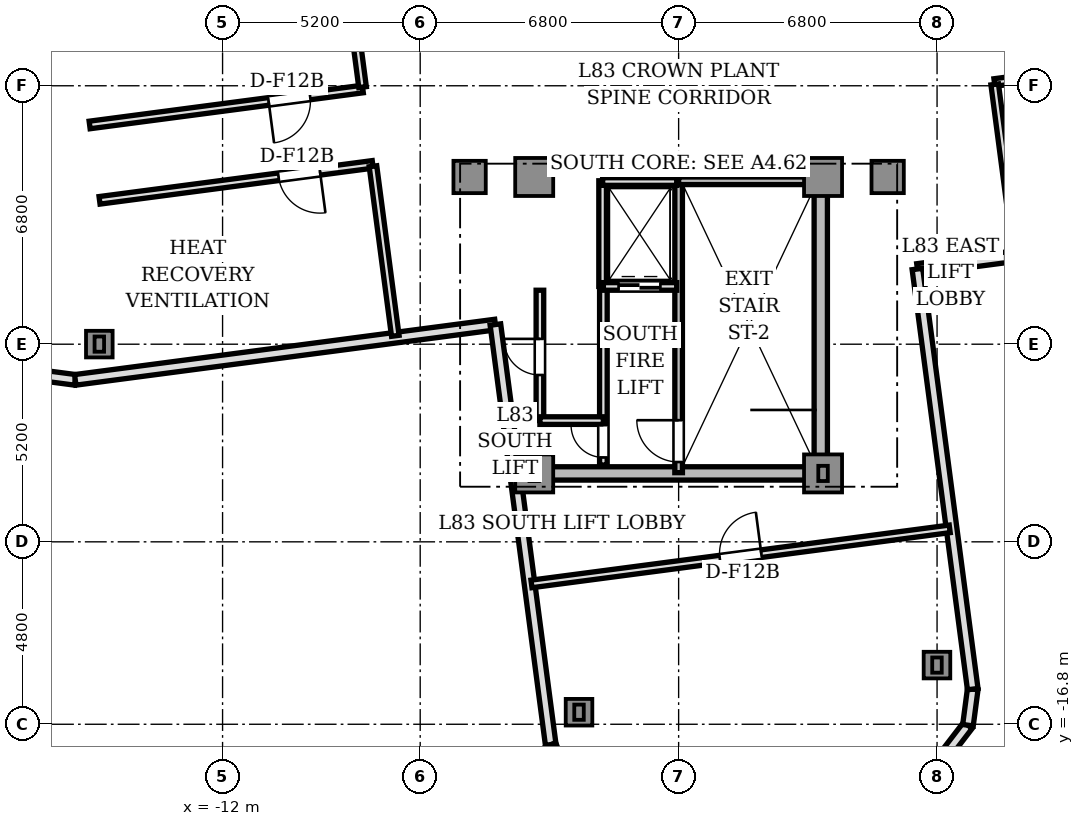
"""IFC4 building model, lengths in metres.
Left out: names, types, materials, properties, quantities, classifications, styles, units other than length and angle.
Written with IfcOpenShell. Run it as: python <this file> out.ifc"""

import sys

from ifc_helpers import new_model, si_unit, direction, frame, frame_2d, origin, origin_2d, place, context, subcontext, project, spatial, polyline, rectangle, i_section, outline, extrude, source, transform, mapped, element, fill, save


model = new_model("IFC4")
c1 = context("Model", 3, precision=1e-05, world=origin(), true_north=direction((0.0, 1.0)))
c2 = subcontext(c1, "Body", "Model", "MODEL_VIEW")
j1 = project(units=[si_unit("LENGTHUNIT", "METRE"), si_unit("PLANEANGLEUNIT", "RADIAN")], contexts=[c1])
p1 = place(None, origin())
s1 = spatial("IfcSite", under=j1, at=p1, CompositionType="ELEMENT")
p2 = place(p1, origin())
s2 = spatial("IfcBuilding", under=s1, at=p2, CompositionType="ELEMENT")
p3 = place(p2, frame((0.0, 0.0, 300.3)))
s3 = spatial("IfcBuildingStorey", under=s2, at=p3, CompositionType="ELEMENT", Elevation=300.3)
p4 = place(p3, frame((-3.55, -10.2, 0.0), z_axis=(0.0, 0.0, 1.0), x_axis=(1.0, 0.0, 0.0)))
e1 = element("IfcWall", 1, at=p4, inside=s3, PredefinedType="SHEAR", context=c2, shape_type="SweptSolid", body=[
    extrude(rectangle(XDim=7.1, YDim=0.35, at=frame_2d((3.55, 0.0))), origin(), (0.0, 0.0, 1.0), 4.25),
])
p5 = place(p3, frame((3.74, -9.75, 0.0), z_axis=(0.0, 0.0, 1.0), x_axis=(0.0, 1.0, 0.0)))
e2 = element("IfcWall", 2, at=p5, inside=s3, PredefinedType="SHEAR", context=c2, shape_type="SweptSolid", body=[
    extrude(rectangle(XDim=6.9, YDim=0.35, at=frame_2d((3.45, 0.0))), origin(), (0.0, 0.0, 1.0), 4.25),
])
m1 = source(origin(), c2, "Body", "SweptSolid", [
    extrude(rectangle(XDim=1.0, YDim=1.0, at=origin_2d()), origin(), (0.0, 0.0, 1.0), 4.25),
])
for number, where, z_axis, x_axis in (
    (3, (-3.8, -2.4, 0.0), (0.0, 0.0, 1.0), (1.0, 0.0, 0.0)),
    (4, (3.8, -2.4, 0.0), (0.0, 0.0, 1.0), (1.0, 0.0, 0.0)),
    (5, (-3.8, -10.2, 0.0), (0.0, 0.0, 1.0), (1.0, 0.0, 0.0)),
    (6, (3.8, -10.2, 0.0), (0.0, 0.0, 1.0), (1.0, 0.0, 0.0)),
):
    element("IfcColumn", number, at=place(p3, frame(where, z_axis=z_axis, x_axis=x_axis)), inside=s3, PredefinedType="COLUMN", context=c2, shape_type="MappedRepresentation", body=[
        mapped(m1, transform((0.0, 0.0, 0.0), scale=1.0)),
    ])
m2 = source(origin(), c2, "Body", "SweptSolid", [
    extrude(rectangle(XDim=0.85, YDim=0.85, at=origin_2d()), origin(), (0.0, 0.0, 1.0), 4.25),
])
for number, where, z_axis, x_axis in (
    (7, (5.5, -2.4, 0.0), (0.0, 0.0, 1.0), (1.0, 0.0, 0.0)),
    (8, (-5.5, -2.4, 0.0), (0.0, 0.0, 1.0), (1.0, 0.0, 0.0)),
):
    element("IfcColumn", number, at=place(p3, frame(where, z_axis=z_axis, x_axis=x_axis)), inside=s3, PredefinedType="COLUMN", context=c2, shape_type="MappedRepresentation", body=[
        mapped(m2, transform((0.0, 0.0, 0.0), scale=1.0)),
    ])
m3 = source(origin(), c2, "Body", "SweptSolid", [
    extrude(rectangle(XDim=0.7, YDim=0.7, at=origin_2d()), origin(), (0.0, 0.0, 1.0), 4.25),
])
for number, where, z_axis, x_axis in (
    (9, (-15.243, -6.798, 0.0), (0.0, 0.0, 1.0), (1.0, 0.0, 0.0)),
    (10, (-2.621, -16.483, 0.0), (0.0, 0.0, 1.0), (1.0, 0.0, 0.0)),
    (11, (6.798, -15.243, 0.0), (0.0, 0.0, 1.0), (1.0, 0.0, 0.0)),
):
    element("IfcColumn", number, at=place(p3, frame(where, z_axis=z_axis, x_axis=x_axis)), inside=s3, PredefinedType="COLUMN", context=c2, shape_type="MappedRepresentation", body=[
        mapped(m3, transform((0.0, 0.0, 0.0), scale=1.0)),
    ])
m4 = source(origin(), c2, "Body", "SweptSolid", [
    extrude(i_section(OverallWidth=0.25, OverallDepth=0.4, WebThickness=0.013, FlangeThickness=0.013, FilletRadius=0.014, at=origin_2d()), origin(), (0.0, 0.0, 1.0), 5.959),
])
p6 = place(p3, frame((-3.8, -10.2, 4.25), z_axis=(0.0, 0.0, 1.0), x_axis=(1.0, 0.0, 0.0)))
e12 = element("IfcColumn", 12, at=p6, inside=s3, PredefinedType="COLUMN", context=c2, shape_type="MappedRepresentation", body=[
    mapped(m4, transform((0.0, 0.0, 0.0), scale=1.0)),
])
m5 = source(origin(), c2, "Body", "SweptSolid", [
    extrude(i_section(OverallWidth=0.25, OverallDepth=0.4, WebThickness=0.013, FlangeThickness=0.013, FilletRadius=0.014, at=origin_2d()), origin(), (0.0, 0.0, 1.0), 8.953),
])
p7 = place(p3, frame((3.8, -10.2, 4.25), z_axis=(0.0, 0.0, 1.0), x_axis=(1.0, 0.0, 0.0)))
e13 = element("IfcColumn", 13, at=p7, inside=s3, PredefinedType="COLUMN", context=c2, shape_type="MappedRepresentation", body=[
    mapped(m5, transform((0.0, 0.0, 0.0), scale=1.0)),
])
m6 = source(origin(), c2, "Body", "SweptSolid", [
    extrude(i_section(OverallWidth=0.25, OverallDepth=0.4, WebThickness=0.013, FlangeThickness=0.013, FilletRadius=0.014, at=origin_2d()), origin(), (0.0, 0.0, 1.0), 1.452),
])
p8 = place(p3, frame((-15.243, -6.798, 4.25), z_axis=(0.0, 0.0, 1.0), x_axis=(1.0, 0.0, 0.0)))
e14 = element("IfcColumn", 14, at=p8, inside=s3, PredefinedType="COLUMN", context=c2, shape_type="MappedRepresentation", body=[
    mapped(m6, transform((0.0, 0.0, 0.0), scale=1.0)),
])
m7 = source(origin(), c2, "Body", "SweptSolid", [
    extrude(i_section(OverallWidth=0.25, OverallDepth=0.4, WebThickness=0.013, FlangeThickness=0.013, FilletRadius=0.014, at=origin_2d()), origin(), (0.0, 0.0, 1.0), 6.424),
])
p9 = place(p3, frame((-2.621, -16.483, 4.25), z_axis=(0.0, 0.0, 1.0), x_axis=(1.0, 0.0, 0.0)))
e15 = element("IfcColumn", 15, at=p9, inside=s3, PredefinedType="COLUMN", context=c2, shape_type="MappedRepresentation", body=[
    mapped(m7, transform((0.0, 0.0, 0.0), scale=1.0)),
])
m8 = source(origin(), c2, "Body", "SweptSolid", [
    extrude(i_section(OverallWidth=0.25, OverallDepth=0.4, WebThickness=0.013, FlangeThickness=0.013, FilletRadius=0.014, at=origin_2d()), origin(), (0.0, 0.0, 1.0), 10.134),
])
p10 = place(p3, frame((6.798, -15.243, 4.25), z_axis=(0.0, 0.0, 1.0), x_axis=(1.0, 0.0, 0.0)))
e16 = element("IfcColumn", 16, at=p10, inside=s3, PredefinedType="COLUMN", context=c2, shape_type="MappedRepresentation", body=[
    mapped(m8, transform((0.0, 0.0, 0.0), scale=1.0)),
])
p11 = place(p3, frame((6.283, -4.821, 0.0), z_axis=(0.0, 0.0, 1.0), x_axis=(0.991445499165, 0.130521347626, 0.0)))
e17 = element("IfcWall", 17, at=p11, inside=s3, PredefinedType="SOLIDWALL", context=c2, shape_type="SweptSolid", body=[
    extrude(outline(polyline([(0.0, 0.0), (11.15, 0.0), (11.15, 18.529), (0.0, 14.175), (0.0, 0.0)])), frame((0.0, 0.14, 0.0), z_axis=(0.0, -1.0, 0.0), x_axis=(1.0, 0.0, 0.0)), (0.0, 0.0, 1.0), 0.28),
])
p12 = place(p3, frame((-16.825, -7.613, 0.0), z_axis=(0.0, 0.0, 1.0), x_axis=(0.991444747987, -0.130527053476, 0.0)))
e18 = element("IfcWall", 18, at=p12, inside=s3, PredefinedType="SOLIDWALL", context=c2, shape_type="SweptSolid", body=[
    extrude(outline(polyline([(0.0, 0.0), (0.958, 0.0), (0.958, 5.446), (0.0, 5.072), (0.0, 0.0)])), frame((0.0, 0.14, 0.0), z_axis=(0.0, -1.0, 0.0), x_axis=(1.0, 0.0, 0.0)), (0.0, 0.0, 1.0), 0.28),
])
p13 = place(p3, frame((-15.876, -7.738, 0.0), z_axis=(0.0, 0.0, 1.0), x_axis=(0.991445499165, 0.130521347626, 0.0)))
e19 = element("IfcWall", 19, at=p13, inside=s3, PredefinedType="SOLIDWALL", context=c2, shape_type="SweptSolid", body=[
    extrude(outline(polyline([(0.0, 0.0), (11.15, 0.0), (11.15, 9.801), (0.0, 5.446), (0.0, 0.0)])), frame((0.0, 0.14, 0.0), z_axis=(0.0, -1.0, 0.0), x_axis=(1.0, 0.0, 0.0)), (0.0, 0.0, 1.0), 0.28),
])
p14 = place(p3, frame((-4.821, -6.283, 0.0), z_axis=(0.0, 0.0, 1.0), x_axis=(0.130521347626, -0.991445499165, 0.0)))
e20 = element("IfcWall", 20, at=p14, inside=s3, PredefinedType="SOLIDWALL", context=c2, shape_type="SweptSolid", body=[
    extrude(outline(polyline([(0.0, 0.0), (11.15, 0.0), (11.15, 10.374), (0.0, 9.801), (0.0, 0.0)])), frame((0.0, 0.14, 0.0), z_axis=(0.0, -1.0, 0.0), x_axis=(1.0, 0.0, 0.0)), (0.0, 0.0, 1.0), 0.28),
])
p15 = place(p3, frame((-3.366, -17.338, 0.0), z_axis=(0.0, 0.0, 1.0), x_axis=(0.382659506909, -0.923889442397, 0.0)))
e21 = element("IfcWall", 21, at=p15, inside=s3, PredefinedType="SOLIDWALL", context=c2, shape_type="SweptSolid", body=[
    extrude(outline(polyline([(0.0, 0.0), (0.958, 0.0), (0.958, 10.519), (0.0, 10.374), (0.0, 0.0)])), frame((0.0, 0.14, 0.0), z_axis=(0.0, -1.0, 0.0), x_axis=(1.0, 0.0, 0.0)), (0.0, 0.0, 1.0), 0.28),
])
p16 = place(p3, frame((7.031, -17.585, 0.0), z_axis=(0.0, 0.0, 1.0), x_axis=(0.60861352168, 0.793466811674, 0.0)))
e22 = element("IfcWall", 22, at=p16, inside=s3, PredefinedType="SOLIDWALL", context=c2, shape_type="SweptSolid", body=[
    extrude(outline(polyline([(0.0, 0.0), (0.958, 0.0), (0.958, 14.699), (0.0, 14.469), (0.0, 0.0)])), frame((0.0, 0.14, 0.0), z_axis=(0.0, -1.0, 0.0), x_axis=(1.0, 0.0, 0.0)), (0.0, 0.0, 1.0), 0.28),
])
p17 = place(p3, frame((7.613, -16.825, 0.0), z_axis=(0.0, 0.0, 1.0), x_axis=(0.130527053476, 0.991444747987, 0.0)))
e23 = element("IfcWall", 23, at=p17, inside=s3, PredefinedType="SOLIDWALL", context=c2, shape_type="SweptSolid", body=[
    extrude(outline(polyline([(0.0, 0.0), (0.958, 0.0), (0.958, 14.748), (0.0, 14.699), (0.0, 0.0)])), frame((0.0, 0.14, 0.0), z_axis=(0.0, -1.0, 0.0), x_axis=(1.0, 0.0, 0.0)), (0.0, 0.0, 1.0), 0.28),
])
p18 = place(p3, frame((7.738, -15.876, 0.0), z_axis=(0.0, 0.0, 1.0), x_axis=(-0.130521347626, 0.991445499165, 0.0)))
e24 = element("IfcWall", 24, at=p18, inside=s3, PredefinedType="SOLIDWALL", context=c2, shape_type="SweptSolid", body=[
    extrude(outline(polyline([(0.0, 0.0), (11.15, 0.0), (11.15, 14.175), (0.0, 14.748), (0.0, 0.0)])), frame((0.0, 0.14, 0.0), z_axis=(0.0, -1.0, 0.0), x_axis=(1.0, 0.0, 0.0)), (0.0, 0.0, 1.0), 0.28),
])
p19 = place(p3, frame((0.0, -10.18, 0.0), z_axis=(0.0, 0.0, 1.0), x_axis=(0.0, 1.0, 0.0)))
e25 = element("IfcWall", 25, at=p19, inside=s3, PredefinedType="SOLIDWALL", context=c2, shape_type="SweptSolid", body=[
    extrude(rectangle(XDim=7.68, YDim=0.2, at=frame_2d((3.84, 0.0))), origin(), (0.0, 0.0, 1.0), 4.15),
])
p20 = place(p19, frame((0.28, 0.0, 0.0)))
e26 = element("IfcOpeningElement", 26, at=p20, cuts=e25, PredefinedType="OPENING", context=c2, shape_type="SweptSolid", body=[
    extrude(rectangle(XDim=1.1, YDim=2.15, at=frame_2d((0.55, 1.075))), frame((0.0, 0.11, 0.0), z_axis=(0.0, -1.0, 0.0), x_axis=(1.0, 0.0, 0.0)), (0.0, 0.0, 1.0), 0.22),
])
p21 = place(p3, frame((0.0, -2.5, 0.0), z_axis=(0.0, 0.0, 1.0), x_axis=(1.0, 0.0, 0.0)))
e27 = element("IfcWall", 27, at=p21, inside=s3, PredefinedType="SOLIDWALL", context=c2, shape_type="SweptSolid", body=[
    extrude(rectangle(XDim=3.72, YDim=0.2, at=frame_2d((1.86, 0.0))), origin(), (0.0, 0.0, 1.0), 4.15),
])
p22 = place(p3, frame((-1.98, -9.98, 0.0), z_axis=(0.0, 0.0, 1.0), x_axis=(0.0, 1.0, 0.0)))
e28 = element("IfcWall", 28, at=p22, inside=s3, PredefinedType="SOLIDWALL", context=c2, shape_type="SweptSolid", body=[
    extrude(rectangle(XDim=4.66, YDim=0.2, at=frame_2d((2.33, 0.0))), origin(), (0.0, 0.0, 1.0), 3.7),
])
p23 = place(p22, frame((0.2, 0.0, 0.0)))
e29 = element("IfcOpeningElement", 29, at=p23, cuts=e28, PredefinedType="OPENING", context=c2, shape_type="SweptSolid", body=[
    extrude(rectangle(XDim=0.85, YDim=2.1, at=frame_2d((0.425, 1.05))), frame((0.0, 0.11, 0.0), z_axis=(0.0, -1.0, 0.0), x_axis=(1.0, 0.0, 0.0)), (0.0, 0.0, 1.0), 0.22),
])
p24 = place(p3, frame((-2.0, -5.28, 0.0), z_axis=(0.0, 0.0, 1.0), x_axis=(0.0, 1.0, 0.0)))
e30 = element("IfcWall", 30, at=p24, inside=s3, PredefinedType="SOLIDWALL", context=c2, shape_type="SweptSolid", body=[
    extrude(rectangle(XDim=2.78, YDim=0.2, at=frame_2d((1.39, 0.0))), origin(), (0.0, 0.0, 1.0), 3.7),
])
p25 = place(p3, frame((-2.0, -2.52, 0.0), z_axis=(0.0, 0.0, 1.0), x_axis=(1.0, 0.0, 0.0)))
e31 = element("IfcWall", 31, at=p25, inside=s3, PredefinedType="SOLIDWALL", context=c2, shape_type="SweptSolid", body=[
    extrude(rectangle(XDim=1.95, YDim=0.2, at=frame_2d((0.975, 0.0))), origin(), (0.0, 0.0, 1.0), 3.7),
])
p26 = place(p3, frame((-1.98, -5.28, 0.0), z_axis=(0.0, 0.0, 1.0), x_axis=(1.0, 0.0, 0.0)))
e32 = element("IfcWall", 32, at=p26, inside=s3, PredefinedType="SOLIDWALL", context=c2, shape_type="SweptSolid", body=[
    extrude(rectangle(XDim=1.93, YDim=0.2, at=frame_2d((0.965, 0.0))), origin(), (0.0, 0.0, 1.0), 3.7),
])
p27 = place(p26, frame((0.4, 0.0, 0.0)))
e33 = element("IfcOpeningElement", 33, at=p27, cuts=e32, PredefinedType="OPENING", context=c2, shape_type="SweptSolid", body=[
    extrude(rectangle(XDim=1.1, YDim=2.2, at=frame_2d((0.55, 1.1))), frame((0.0, 0.11, 0.0), z_axis=(0.0, -1.0, 0.0), x_axis=(1.0, 0.0, 0.0)), (0.0, 0.0, 1.0), 0.22),
])
p28 = place(p3, frame((-3.65, -8.81, 0.0), z_axis=(0.0, 0.0, 1.0), x_axis=(0.0, 1.0, 0.0)))
e34 = element("IfcWall", 34, at=p28, inside=s3, PredefinedType="SOLIDWALL", context=c2, shape_type="SweptSolid", body=[
    extrude(rectangle(XDim=3.43, YDim=0.2, at=frame_2d((1.715, 0.0))), origin(), (0.0, 0.0, 1.0), 3.7),
])
p29 = place(p28, frame((1.2, 0.0, 0.0)))
e35 = element("IfcOpeningElement", 35, at=p29, cuts=e34, PredefinedType="OPENING", context=c2, shape_type="SweptSolid", body=[
    extrude(rectangle(XDim=0.95, YDim=2.15, at=frame_2d((0.475, 1.075))), frame((0.0, 0.11, 0.0), z_axis=(0.0, -1.0, 0.0), x_axis=(1.0, 0.0, 0.0)), (0.0, 0.0, 1.0), 0.22),
])
p30 = place(p3, frame((-3.65, -8.81, 0.0), z_axis=(0.0, 0.0, 1.0), x_axis=(1.0, 0.0, 0.0)))
e36 = element("IfcWall", 36, at=p30, inside=s3, PredefinedType="SOLIDWALL", context=c2, shape_type="SweptSolid", body=[
    extrude(rectangle(XDim=1.67, YDim=0.2, at=frame_2d((0.835, 0.0))), origin(), (0.0, 0.0, 1.0), 3.7),
])
p31 = place(p3, frame((8.31, 0.085, 0.0), z_axis=(0.0, 0.0, 1.0), x_axis=(0.991445353075, 0.130522457324, 0.0)))
e37 = element("IfcWall", 37, at=p31, inside=s3, PredefinedType="SOLIDWALL", context=c2, shape_type="SweptSolid", body=[
    extrude(rectangle(XDim=7.25, YDim=0.2, at=frame_2d((3.625, 0.0))), origin(), (0.0, 0.0, 1.0), 3.7),
])
p32 = place(p31, frame((1.4, 0.0, 0.0)))
e38 = element("IfcOpeningElement", 38, at=p32, cuts=e37, PredefinedType="OPENING", context=c2, shape_type="SweptSolid", body=[
    extrude(rectangle(XDim=1.1, YDim=2.15, at=frame_2d((0.55, 1.075))), frame((0.0, 0.11, 0.0), z_axis=(0.0, -1.0, 0.0), x_axis=(1.0, 0.0, 0.0)), (0.0, 0.0, 1.0), 0.22),
])
p33 = place(p3, frame((8.904, -4.426, 0.0), z_axis=(0.0, 0.0, 1.0), x_axis=(-0.130528890923, 0.991444506079, 0.0)))
e39 = element("IfcWall", 39, at=p33, inside=s3, PredefinedType="SOLIDWALL", context=c2, shape_type="SweptSolid", body=[
    extrude(rectangle(XDim=4.5, YDim=0.2, at=frame_2d((2.25, 0.0))), origin(), (0.0, 0.0, 1.0), 3.7),
])
p34 = place(p3, frame((-8.049, -2.068, 0.0), z_axis=(0.0, 0.0, 1.0), x_axis=(-0.991445353075, -0.130522457324, 0.0)))
e40 = element("IfcWall", 40, at=p34, inside=s3, PredefinedType="SOLIDWALL", context=c2, shape_type="SweptSolid", body=[
    extrude(rectangle(XDim=7.25, YDim=0.2, at=frame_2d((3.625, 0.0))), origin(), (0.0, 0.0, 1.0), 3.7),
])
p35 = place(p34, frame((1.4, 0.0, 0.0)))
e41 = element("IfcOpeningElement", 41, at=p35, cuts=e40, PredefinedType="OPENING", context=c2, shape_type="SweptSolid", body=[
    extrude(rectangle(XDim=1.1, YDim=2.15, at=frame_2d((0.55, 1.075))), frame((0.0, 0.11, 0.0), z_axis=(0.0, -1.0, 0.0), x_axis=(1.0, 0.0, 0.0)), (0.0, 0.0, 1.0), 0.22),
])
p36 = place(p3, frame((-8.042, -2.118, 0.0), z_axis=(0.0, 0.0, 1.0), x_axis=(0.130535912089, -0.99144358168, 0.0)))
e42 = element("IfcWall", 42, at=p36, inside=s3, PredefinedType="SOLIDWALL", context=c2, shape_type="SweptSolid", body=[
    extrude(rectangle(XDim=4.5, YDim=0.2, at=frame_2d((2.25, 0.0))), origin(), (0.0, 0.0, 1.0), 3.7),
])
p37 = place(p3, frame((-8.31, -0.085, 0.0), z_axis=(0.0, 0.0, 1.0), x_axis=(-0.991445353075, -0.130522457324, 0.0)))
e43 = element("IfcWall", 43, at=p37, inside=s3, PredefinedType="SOLIDWALL", context=c2, shape_type="SweptSolid", body=[
    extrude(rectangle(XDim=7.25, YDim=0.2, at=frame_2d((3.625, 0.0))), origin(), (0.0, 0.0, 1.0), 3.7),
])
p38 = place(p37, frame((1.4, 0.0, 0.0)))
e44 = element("IfcOpeningElement", 44, at=p38, cuts=e43, PredefinedType="OPENING", context=c2, shape_type="SweptSolid", body=[
    extrude(rectangle(XDim=1.1, YDim=2.15, at=frame_2d((0.55, 1.075))), frame((0.0, 0.11, 0.0), z_axis=(0.0, -1.0, 0.0), x_axis=(1.0, 0.0, 0.0)), (0.0, 0.0, 1.0), 0.22),
])
p39 = place(p3, frame((-8.904, 4.426, 0.0), z_axis=(0.0, 0.0, 1.0), x_axis=(0.130528890923, -0.991444506079, 0.0)))
e45 = element("IfcWall", 45, at=p39, inside=s3, PredefinedType="SOLIDWALL", context=c2, shape_type="SweptSolid", body=[
    extrude(rectangle(XDim=4.5, YDim=0.2, at=frame_2d((2.25, 0.0))), origin(), (0.0, 0.0, 1.0), 3.7),
])
p40 = place(p3, frame((-3.872, -13.108, 0.0), z_axis=(0.0, 0.0, 1.0), x_axis=(0.991443437127, 0.130537009991, 0.0)))
e46 = element("IfcWall", 46, at=p40, inside=s3, PredefinedType="SOLIDWALL", context=c2, shape_type="SweptSolid", body=[
    extrude(rectangle(XDim=11.1, YDim=0.2, at=frame_2d((5.55, 0.0))), origin(), (0.0, 0.0, 1.0), 3.7),
])
p41 = place(p40, frame((5.0, 0.0, 0.0)))
e47 = element("IfcOpeningElement", 47, at=p41, cuts=e46, PredefinedType="OPENING", context=c2, shape_type="SweptSolid", body=[
    extrude(rectangle(XDim=1.1, YDim=2.15, at=frame_2d((0.55, 1.075))), frame((0.0, 0.11, 0.0), z_axis=(0.0, -1.0, 0.0), x_axis=(1.0, 0.0, 0.0)), (0.0, 0.0, 1.0), 0.22),
])
m9 = source(origin(), c2, "Body", "SweptSolid", [
    extrude(rectangle(XDim=1.1, YDim=0.05, at=origin_2d()), origin(), (0.0, 0.0, 1.0), 2.15),
])
p42 = place(p20, frame((0.55, 0.0, 0.0)))
e48 = element("IfcDoor", 48, at=p42, inside=s3, OperationType="SINGLE_SWING_RIGHT", PredefinedType="DOOR", context=c2, shape_type="MappedRepresentation", body=[
    mapped(m9, transform((0.0, 0.0, 0.0), scale=1.0)),
])
fill(e26, e48)
m10 = source(origin(), c2, "Body", "SweptSolid", [
    extrude(rectangle(XDim=0.85, YDim=0.05, at=origin_2d()), origin(), (0.0, 0.0, 1.0), 2.1),
])
p43 = place(p23, frame((0.425, 0.0, 0.0)))
e49 = element("IfcDoor", 49, at=p43, inside=s3, OperationType="SINGLE_SWING_RIGHT", PredefinedType="DOOR", context=c2, shape_type="MappedRepresentation", body=[
    mapped(m10, transform((0.0, 0.0, 0.0), scale=1.0)),
])
fill(e29, e49)
m11 = source(origin(), c2, "Body", "SweptSolid", [
    extrude(rectangle(XDim=1.1, YDim=0.05, at=origin_2d()), origin(), (0.0, 0.0, 1.0), 2.2),
])
p44 = place(p27, frame((0.55, 0.0, 0.0)))
e50 = element("IfcDoor", 50, at=p44, inside=s3, OperationType="DOUBLE_DOOR_SLIDING", PredefinedType="DOOR", context=c2, shape_type="MappedRepresentation", body=[
    mapped(m11, transform((0.0, 0.0, 0.0), scale=1.0)),
])
fill(e33, e50)
m12 = source(origin(), c2, "Body", "SweptSolid", [
    extrude(rectangle(XDim=0.95, YDim=0.05, at=origin_2d()), origin(), (0.0, 0.0, 1.0), 2.15),
])
p45 = place(p29, frame((0.475, 0.0, 0.0)))
e51 = element("IfcDoor", 51, at=p45, inside=s3, OperationType="SINGLE_SWING_RIGHT", PredefinedType="DOOR", context=c2, shape_type="MappedRepresentation", body=[
    mapped(m12, transform((0.0, 0.0, 0.0), scale=1.0)),
])
fill(e35, e51)
p46 = place(p35, frame((0.55, 0.0, 0.0)))
e52 = element("IfcDoor", 52, at=p46, inside=s3, OperationType="SINGLE_SWING_LEFT", PredefinedType="DOOR", context=c2, shape_type="MappedRepresentation", body=[
    mapped(m9, transform((0.0, 0.0, 0.0), scale=1.0)),
])
fill(e41, e52)
p47 = place(p38, frame((0.55, 0.0, 0.0)))
e53 = element("IfcDoor", 53, at=p47, inside=s3, OperationType="SINGLE_SWING_RIGHT", PredefinedType="DOOR", context=c2, shape_type="MappedRepresentation", body=[
    mapped(m9, transform((0.0, 0.0, 0.0), scale=1.0)),
])
fill(e44, e53)
p48 = place(p41, frame((0.55, 0.0, 0.0)))
e54 = element("IfcDoor", 54, at=p48, inside=s3, OperationType="SINGLE_SWING_RIGHT", PredefinedType="DOOR", context=c2, shape_type="MappedRepresentation", body=[
    mapped(m9, transform((0.0, 0.0, 0.0), scale=1.0)),
])
fill(e47, e54)
save(model, sys.argv[1])
